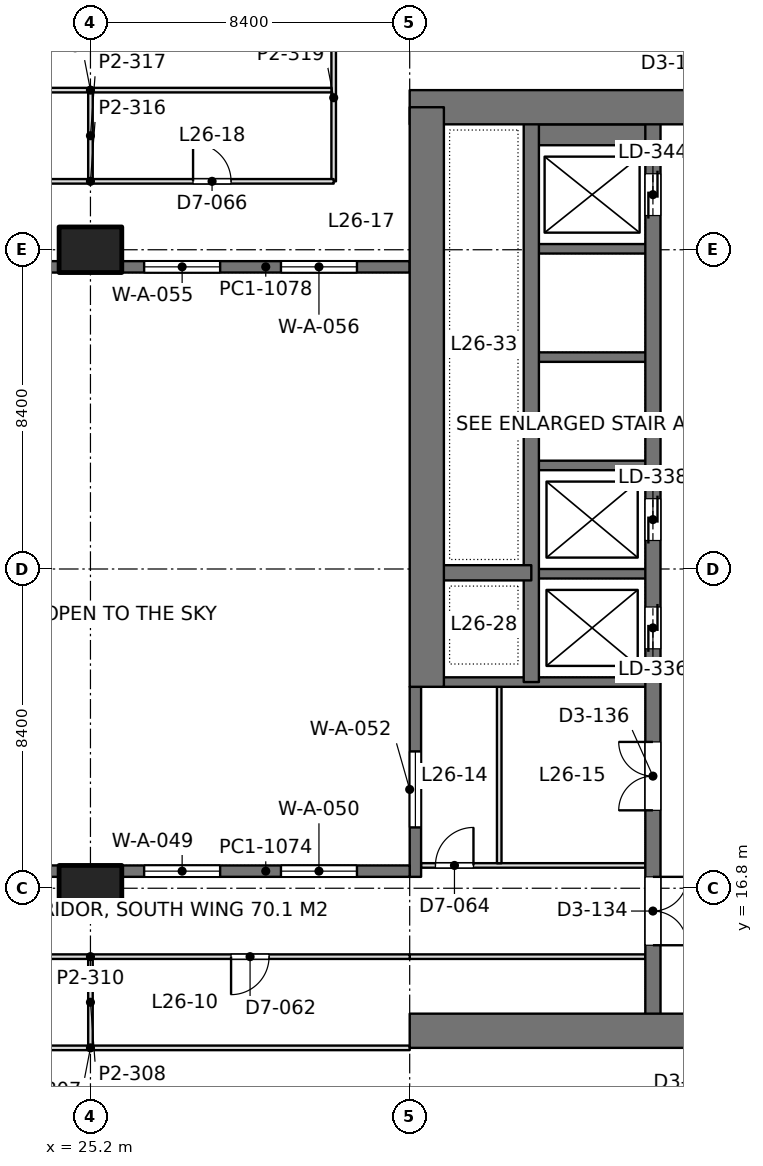
"""IFC4 building model, lengths in metres.
Left out: names, types, materials, properties, quantities, classifications, styles, units other than length and angle.
Written with IfcOpenShell. Run it as: python <this file> out.ifc"""

import sys

from ifc_helpers import new_model, si_unit, direction, frame, frame_2d, origin, origin_2d, place, context, subcontext, project, spatial, rectangle, extrude, element, fill, save


model = new_model("IFC4")
c1 = context("Model", 3, precision=1e-05, world=origin(), true_north=direction((0.0, 1.0)))
c2 = subcontext(c1, "Body", "Model", "MODEL_VIEW")
j1 = project(units=[si_unit("LENGTHUNIT", "METRE"), si_unit("PLANEANGLEUNIT", "RADIAN")], contexts=[c1])
p1 = place(None, origin())
s1 = spatial("IfcSite", under=j1, at=p1, CompositionType="ELEMENT")
p2 = place(p1, origin())
s2 = spatial("IfcBuilding", under=s1, at=p2, CompositionType="ELEMENT")
p3 = place(p2, frame((0.0, 0.0, 117.6)))
s3 = spatial("IfcBuildingStorey", under=s2, at=p3, CompositionType="ELEMENT", Elevation=117.6)
for number, where, z_axis, x_axis in (
    (1, (25.2, 16.8, 0.0), (0.0, 0.0, 1.0), (1.0, 0.0, 0.0)),
    (2, (25.2, 33.6, 0.0), (0.0, 0.0, 1.0), (1.0, 0.0, 0.0)),
):
    element("IfcColumn", number, at=place(p3, frame(where, z_axis=z_axis, x_axis=x_axis)), inside=s3, PredefinedType="COLUMN", context=c2, shape_type="SweptSolid", body=[
        extrude(rectangle(XDim=1.65, YDim=1.2, at=origin_2d()), origin(), (0.0, 0.0, 1.0), 4.2),
    ])
p4 = place(p3, frame((33.6, 13.05, 0.0), z_axis=(0.0, 0.0, 1.0), x_axis=(1.0, 0.0, 0.0)))
e3 = element("IfcWall", 3, at=p4, inside=s3, PredefinedType="SHEAR", context=c2, shape_type="SweptSolid", body=[
    extrude(rectangle(XDim=18.0, YDim=0.9, at=frame_2d((9.0, 0.0))), origin(), (0.0, 0.0, 1.0), 4.2),
])
p5 = place(p4, frame((7.25, 0.0, 0.0)))
e4 = element("IfcOpeningElement", 4, at=p5, cuts=e3, PredefinedType="OPENING", context=c2, shape_type="SweptSolid", body=[
    extrude(rectangle(XDim=1.8, YDim=2.4, at=frame_2d((0.9, 1.2))), frame((0.0, 0.46, 0.0), z_axis=(0.0, -1.0, 0.0), x_axis=(1.0, 0.0, 0.0)), (0.0, 0.0, 1.0), 0.92),
])
p6 = place(p3, frame((33.6, 37.35, 0.0), z_axis=(0.0, 0.0, 1.0), x_axis=(1.0, 0.0, 0.0)))
e5 = element("IfcWall", 5, at=p6, inside=s3, PredefinedType="SHEAR", context=c2, shape_type="SweptSolid", body=[
    extrude(rectangle(XDim=18.0, YDim=0.9, at=frame_2d((9.0, 0.0))), origin(), (0.0, 0.0, 1.0), 4.2),
])
p7 = place(p6, frame((7.25, 0.0, 0.0)))
e6 = element("IfcOpeningElement", 6, at=p7, cuts=e5, PredefinedType="OPENING", context=c2, shape_type="SweptSolid", body=[
    extrude(rectangle(XDim=1.8, YDim=2.4, at=frame_2d((0.9, 1.2))), frame((0.0, 0.46, 0.0), z_axis=(0.0, -1.0, 0.0), x_axis=(1.0, 0.0, 0.0)), (0.0, 0.0, 1.0), 0.92),
])
p8 = place(p3, frame((34.05, 22.1, 0.0), z_axis=(0.0, 0.0, 1.0), x_axis=(0.0, 1.0, 0.0)))
e7 = element("IfcWall", 7, at=p8, inside=s3, PredefinedType="SHEAR", context=c2, shape_type="SweptSolid", body=[
    extrude(rectangle(XDim=15.25, YDim=0.9, at=frame_2d((7.625, 0.0))), origin(), (0.0, 0.0, 1.0), 4.2),
])
p9 = place(p3, frame((40.0, 13.05, 0.0), z_axis=(0.0, 0.0, 1.0), x_axis=(0.0, 1.0, 0.0)))
e8 = element("IfcWall", 8, at=p9, inside=s3, PredefinedType="SHEAR", context=c2, shape_type="SweptSolid", body=[
    extrude(rectangle(XDim=24.3, YDim=0.4, at=frame_2d((12.15, 0.0))), origin(), (0.0, 0.0, 1.0), 4.2),
])
p10 = place(p9, frame((10.05, 0.0, 0.0)))
e9 = element("IfcOpeningElement", 9, at=p10, cuts=e8, PredefinedType="OPENING", context=c2, shape_type="SweptSolid", body=[
    extrude(rectangle(XDim=1.1, YDim=2.2, at=frame_2d((0.55, 1.1))), frame((0.0, 0.21, 0.0), z_axis=(0.0, -1.0, 0.0), x_axis=(1.0, 0.0, 0.0)), (0.0, 0.0, 1.0), 0.42),
])
p11 = place(p9, frame((12.9, 0.0, 0.0)))
e10 = element("IfcOpeningElement", 10, at=p11, cuts=e8, PredefinedType="OPENING", context=c2, shape_type="SweptSolid", body=[
    extrude(rectangle(XDim=1.1, YDim=2.2, at=frame_2d((0.55, 1.1))), frame((0.0, 0.21, 0.0), z_axis=(0.0, -1.0, 0.0), x_axis=(1.0, 0.0, 0.0)), (0.0, 0.0, 1.0), 0.42),
])
p12 = place(p9, frame((21.45, 0.0, 0.0)))
e11 = element("IfcOpeningElement", 11, at=p12, cuts=e8, PredefinedType="OPENING", context=c2, shape_type="SweptSolid", body=[
    extrude(rectangle(XDim=1.1, YDim=2.2, at=frame_2d((0.55, 1.1))), frame((0.0, 0.21, 0.0), z_axis=(0.0, -1.0, 0.0), x_axis=(1.0, 0.0, 0.0)), (0.0, 0.0, 1.0), 0.42),
])
p13 = place(p9, frame((2.25, 0.0, 0.0)))
e12 = element("IfcOpeningElement", 12, at=p13, cuts=e8, PredefinedType="OPENING", context=c2, shape_type="SweptSolid", body=[
    extrude(rectangle(XDim=1.8, YDim=2.4, at=frame_2d((0.9, 1.2))), frame((0.0, 0.21, 0.0), z_axis=(0.0, -1.0, 0.0), x_axis=(1.0, 0.0, 0.0)), (0.0, 0.0, 1.0), 0.42),
])
p14 = place(p9, frame((5.8, 0.0, 0.0)))
e13 = element("IfcOpeningElement", 13, at=p14, cuts=e8, PredefinedType="OPENING", context=c2, shape_type="SweptSolid", body=[
    extrude(rectangle(XDim=1.8, YDim=2.4, at=frame_2d((0.9, 1.2))), frame((0.0, 0.21, 0.0), z_axis=(0.0, -1.0, 0.0), x_axis=(1.0, 0.0, 0.0)), (0.0, 0.0, 1.0), 0.42),
])
p15 = place(p3, frame((36.8, 22.225, 0.0), z_axis=(0.0, 0.0, 1.0), x_axis=(0.0, 1.0, 0.0)))
e14 = element("IfcWall", 14, at=p15, inside=s3, PredefinedType="SHEAR", context=c2, shape_type="SweptSolid", body=[
    extrude(rectangle(XDim=15.125, YDim=0.4, at=frame_2d((7.562, 0.0))), origin(), (0.0, 0.0, 1.0), 4.2),
])
p16 = place(p3, frame((36.8, 25.1, 0.0), z_axis=(0.0, 0.0, 1.0), x_axis=(-1.0, 0.0, 0.0)))
e15 = element("IfcWall", 15, at=p16, inside=s3, PredefinedType="SHEAR", context=c2, shape_type="SweptSolid", body=[
    extrude(rectangle(XDim=2.75, YDim=0.4, at=frame_2d((1.375, 0.0))), origin(), (0.0, 0.0, 1.0), 4.2),
])
p17 = place(p3, frame((40.0, 22.225, 0.0), z_axis=(0.0, 0.0, 1.0), x_axis=(-1.0, 0.0, 0.0)))
e16 = element("IfcWall", 16, at=p17, inside=s3, PredefinedType="SHEAR", context=c2, shape_type="SweptSolid", body=[
    extrude(rectangle(XDim=5.95, YDim=0.25, at=frame_2d((2.975, 0.0))), origin(), (0.0, 0.0, 1.0), 4.2),
])
for number, where, z_axis, x_axis in (
    (17, (40.0, 25.075, 0.0), (0.0, 0.0, 1.0), (-1.0, 0.0, 0.0)),
    (18, (40.0, 27.925, 0.0), (0.0, 0.0, 1.0), (-1.0, 0.0, 0.0)),
    (19, (40.0, 30.775, 0.0), (0.0, 0.0, 1.0), (-1.0, 0.0, 0.0)),
    (20, (40.0, 33.625, 0.0), (0.0, 0.0, 1.0), (-1.0, 0.0, 0.0)),
):
    element("IfcWall", number, at=place(p3, frame(where, z_axis=z_axis, x_axis=x_axis)), inside=s3, PredefinedType="SHEAR", context=c2, shape_type="SweptSolid", body=[
        extrude(rectangle(XDim=3.2, YDim=0.25, at=frame_2d((1.6, 0.0))), origin(), (0.0, 0.0, 1.0), 4.2),
    ])
p18 = place(p3, frame((40.0, 36.625, 0.0), z_axis=(0.0, 0.0, 1.0), x_axis=(-1.0, 0.0, 0.0)))
e21 = element("IfcWall", 21, at=p18, inside=s3, PredefinedType="SHEAR", context=c2, shape_type="SweptSolid", body=[
    extrude(rectangle(XDim=3.2, YDim=0.55, at=frame_2d((1.6, 0.0))), origin(), (0.0, 0.0, 1.0), 4.2),
])
p19 = place(p3, frame((33.75, 17.1, 0.0), z_axis=(0.0, 0.0, 1.0), x_axis=(0.0, 1.0, 0.0)))
e22 = element("IfcWall", 22, at=p19, inside=s3, PredefinedType="SOLIDWALL", context=c2, shape_type="SweptSolid", body=[
    extrude(rectangle(XDim=5.0, YDim=0.3, at=frame_2d((2.5, 0.0))), origin(), (0.0, 0.0, 1.0), 4.05),
])
p20 = place(p19, frame((1.3, 0.0, 0.1)))
e23 = element("IfcOpeningElement", 23, at=p20, cuts=e22, PredefinedType="OPENING", context=c2, shape_type="SweptSolid", body=[
    extrude(rectangle(XDim=2.0, YDim=3.0, at=frame_2d((1.0, 1.5))), frame((0.0, 0.16, 0.0), z_axis=(0.0, -1.0, 0.0), x_axis=(1.0, 0.0, 0.0)), (0.0, 0.0, 1.0), 0.32),
])
p21 = place(p3, frame((16.8, 17.25, 0.0), z_axis=(0.0, 0.0, 1.0), x_axis=(1.0, 0.0, 0.0)))
e24 = element("IfcWall", 24, at=p21, inside=s3, PredefinedType="SOLIDWALL", context=c2, shape_type="SweptSolid", body=[
    extrude(rectangle(XDim=7.575, YDim=0.3, at=frame_2d((3.788, 0.0))), origin(), (0.0, 0.0, 1.0), 4.05),
])
p22 = place(p21, frame((0.988, 0.0, 0.1)))
e25 = element("IfcOpeningElement", 25, at=p22, cuts=e24, PredefinedType="OPENING", context=c2, shape_type="SweptSolid", body=[
    extrude(rectangle(XDim=2.0, YDim=3.0, at=frame_2d((1.0, 1.5))), frame((0.0, 0.16, 0.0), z_axis=(0.0, -1.0, 0.0), x_axis=(1.0, 0.0, 0.0)), (0.0, 0.0, 1.0), 0.32),
])
p23 = place(p21, frame((4.587, 0.0, 0.1)))
e26 = element("IfcOpeningElement", 26, at=p23, cuts=e24, PredefinedType="OPENING", context=c2, shape_type="SweptSolid", body=[
    extrude(rectangle(XDim=2.0, YDim=3.0, at=frame_2d((1.0, 1.5))), frame((0.0, 0.16, 0.0), z_axis=(0.0, -1.0, 0.0), x_axis=(1.0, 0.0, 0.0)), (0.0, 0.0, 1.0), 0.32),
])
p24 = place(p3, frame((26.025, 17.25, 0.0), z_axis=(0.0, 0.0, 1.0), x_axis=(1.0, 0.0, 0.0)))
e27 = element("IfcWall", 27, at=p24, inside=s3, PredefinedType="SOLIDWALL", context=c2, shape_type="SweptSolid", body=[
    extrude(rectangle(XDim=7.575, YDim=0.3, at=frame_2d((3.788, 0.0))), origin(), (0.0, 0.0, 1.0), 4.05),
])
p25 = place(p24, frame((0.587, 0.0, 0.1)))
e28 = element("IfcOpeningElement", 28, at=p25, cuts=e27, PredefinedType="OPENING", context=c2, shape_type="SweptSolid", body=[
    extrude(rectangle(XDim=2.0, YDim=3.0, at=frame_2d((1.0, 1.5))), frame((0.0, 0.16, 0.0), z_axis=(0.0, -1.0, 0.0), x_axis=(1.0, 0.0, 0.0)), (0.0, 0.0, 1.0), 0.32),
])
p26 = place(p24, frame((4.188, 0.0, 0.1)))
e29 = element("IfcOpeningElement", 29, at=p26, cuts=e27, PredefinedType="OPENING", context=c2, shape_type="SweptSolid", body=[
    extrude(rectangle(XDim=2.0, YDim=3.0, at=frame_2d((1.0, 1.5))), frame((0.0, 0.16, 0.0), z_axis=(0.0, -1.0, 0.0), x_axis=(1.0, 0.0, 0.0)), (0.0, 0.0, 1.0), 0.32),
])
p27 = place(p3, frame((16.8, 33.15, 0.0), z_axis=(0.0, 0.0, 1.0), x_axis=(1.0, 0.0, 0.0)))
e30 = element("IfcWall", 30, at=p27, inside=s3, PredefinedType="SOLIDWALL", context=c2, shape_type="SweptSolid", body=[
    extrude(rectangle(XDim=7.575, YDim=0.3, at=frame_2d((3.788, 0.0))), origin(), (0.0, 0.0, 1.0), 4.05),
])
p28 = place(p27, frame((0.988, 0.0, 0.1)))
e31 = element("IfcOpeningElement", 31, at=p28, cuts=e30, PredefinedType="OPENING", context=c2, shape_type="SweptSolid", body=[
    extrude(rectangle(XDim=2.0, YDim=3.0, at=frame_2d((1.0, 1.5))), frame((0.0, 0.16, 0.0), z_axis=(0.0, -1.0, 0.0), x_axis=(1.0, 0.0, 0.0)), (0.0, 0.0, 1.0), 0.32),
])
p29 = place(p27, frame((4.587, 0.0, 0.1)))
e32 = element("IfcOpeningElement", 32, at=p29, cuts=e30, PredefinedType="OPENING", context=c2, shape_type="SweptSolid", body=[
    extrude(rectangle(XDim=2.0, YDim=3.0, at=frame_2d((1.0, 1.5))), frame((0.0, 0.16, 0.0), z_axis=(0.0, -1.0, 0.0), x_axis=(1.0, 0.0, 0.0)), (0.0, 0.0, 1.0), 0.32),
])
p30 = place(p3, frame((26.025, 33.15, 0.0), z_axis=(0.0, 0.0, 1.0), x_axis=(1.0, 0.0, 0.0)))
e33 = element("IfcWall", 33, at=p30, inside=s3, PredefinedType="SOLIDWALL", context=c2, shape_type="SweptSolid", body=[
    extrude(rectangle(XDim=7.575, YDim=0.3, at=frame_2d((3.788, 0.0))), origin(), (0.0, 0.0, 1.0), 4.05),
])
p31 = place(p30, frame((0.587, 0.0, 0.1)))
e34 = element("IfcOpeningElement", 34, at=p31, cuts=e33, PredefinedType="OPENING", context=c2, shape_type="SweptSolid", body=[
    extrude(rectangle(XDim=2.0, YDim=3.0, at=frame_2d((1.0, 1.5))), frame((0.0, 0.16, 0.0), z_axis=(0.0, -1.0, 0.0), x_axis=(1.0, 0.0, 0.0)), (0.0, 0.0, 1.0), 0.32),
])
p32 = place(p30, frame((4.188, 0.0, 0.1)))
e35 = element("IfcOpeningElement", 35, at=p32, cuts=e33, PredefinedType="OPENING", context=c2, shape_type="SweptSolid", body=[
    extrude(rectangle(XDim=2.0, YDim=3.0, at=frame_2d((1.0, 1.5))), frame((0.0, 0.16, 0.0), z_axis=(0.0, -1.0, 0.0), x_axis=(1.0, 0.0, 0.0)), (0.0, 0.0, 1.0), 0.32),
])
p33 = place(p3, frame((33.898, 17.4, 0.0), z_axis=(0.0, 0.0, 1.0), x_axis=(1.0, 0.0, 0.0)))
e36 = element("IfcWall", 36, at=p33, inside=s3, PredefinedType="PARTITIONING", context=c2, shape_type="SweptSolid", body=[
    extrude(rectangle(XDim=5.904, YDim=0.12, at=frame_2d((2.952, 0.0))), origin(), (0.0, 0.0, 1.0), 3.55),
])
p34 = place(p33, frame((0.38, 0.0, 0.0)))
e37 = element("IfcOpeningElement", 37, at=p34, cuts=e36, PredefinedType="OPENING", context=c2, shape_type="SweptSolid", body=[
    extrude(rectangle(XDim=1.0, YDim=2.4, at=frame_2d((0.5, 1.2))), frame((0.0, 0.07, 0.0), z_axis=(0.0, -1.0, 0.0), x_axis=(1.0, 0.0, 0.0)), (0.0, 0.0, 1.0), 0.14),
])
p35 = place(p3, frame((35.956, 17.458, 0.0), z_axis=(0.0, 0.0, 1.0), x_axis=(0.0, 1.0, 0.0)))
e38 = element("IfcWall", 38, at=p35, inside=s3, PredefinedType="PARTITIONING", context=c2, shape_type="SweptSolid", body=[
    extrude(rectangle(XDim=4.644, YDim=0.12, at=frame_2d((2.322, 0.0))), origin(), (0.0, 0.0, 1.0), 3.6),
])
p36 = place(p3, frame((33.598, 15.0, 0.0), z_axis=(0.0, 0.0, 1.0), x_axis=(1.0, 0.0, 0.0)))
e39 = element("IfcWall", 39, at=p36, inside=s3, PredefinedType="PARTITIONING", context=c2, shape_type="SweptSolid", body=[
    extrude(rectangle(XDim=6.204, YDim=0.12, at=frame_2d((3.102, 0.0))), origin(), (0.0, 0.0, 1.0), 3.55),
])
p37 = place(p3, frame((25.2, 12.658, 0.0), z_axis=(0.0, 0.0, 1.0), x_axis=(0.0, 1.0, 0.0)))
e40 = element("IfcWall", 40, at=p37, inside=s3, PredefinedType="PARTITIONING", context=c2, shape_type="SweptSolid", body=[
    extrude(rectangle(XDim=2.284, YDim=0.12, at=frame_2d((1.142, 0.0))), origin(), (0.0, 0.0, 1.0), 3.55),
])
p38 = place(p3, frame((16.798, 15.0, 0.0), z_axis=(0.0, 0.0, 1.0), x_axis=(1.0, 0.0, 0.0)))
e41 = element("IfcWall", 41, at=p38, inside=s3, PredefinedType="PARTITIONING", context=c2, shape_type="SweptSolid", body=[
    extrude(rectangle(XDim=16.804, YDim=0.12, at=frame_2d((8.402, 0.0))), origin(), (0.0, 0.0, 1.0), 3.55),
])
p39 = place(p38, frame((3.702, 0.0, 0.0)))
e42 = element("IfcOpeningElement", 42, at=p39, cuts=e41, PredefinedType="OPENING", context=c2, shape_type="SweptSolid", body=[
    extrude(rectangle(XDim=1.0, YDim=2.4, at=frame_2d((0.5, 1.2))), frame((0.0, 0.07, 0.0), z_axis=(0.0, -1.0, 0.0), x_axis=(1.0, 0.0, 0.0)), (0.0, 0.0, 1.0), 0.14),
])
p40 = place(p38, frame((12.102, 0.0, 0.0)))
e43 = element("IfcOpeningElement", 43, at=p40, cuts=e41, PredefinedType="OPENING", context=c2, shape_type="SweptSolid", body=[
    extrude(rectangle(XDim=1.0, YDim=2.4, at=frame_2d((0.5, 1.2))), frame((0.0, 0.07, 0.0), z_axis=(0.0, -1.0, 0.0), x_axis=(1.0, 0.0, 0.0)), (0.0, 0.0, 1.0), 0.14),
])
p41 = place(p3, frame((16.8, 12.6, 0.0), z_axis=(0.0, 0.0, 1.0), x_axis=(1.0, 0.0, 0.0)))
e44 = element("IfcWall", 44, at=p41, inside=s3, PredefinedType="PARTITIONING", context=c2, shape_type="SweptSolid", body=[
    extrude(rectangle(XDim=16.8, YDim=0.12, at=frame_2d((8.4, 0.0))), origin(), (0.0, 0.0, 1.0), 3.55),
])
p42 = place(p3, frame((31.6, 35.4, 0.0), z_axis=(0.0, 0.0, 1.0), x_axis=(0.0, 1.0, 0.0)))
e45 = element("IfcWall", 45, at=p42, inside=s3, PredefinedType="PARTITIONING", context=c2, shape_type="SweptSolid", body=[
    extrude(rectangle(XDim=4.4, YDim=0.12, at=frame_2d((2.2, 0.0))), origin(), (0.0, 0.0, 1.0), 4.05),
])
p43 = place(p3, frame((25.2, 35.458, 0.0), z_axis=(0.0, 0.0, 1.0), x_axis=(0.0, 1.0, 0.0)))
e46 = element("IfcWall", 46, at=p43, inside=s3, PredefinedType="PARTITIONING", context=c2, shape_type="SweptSolid", body=[
    extrude(rectangle(XDim=2.284, YDim=0.12, at=frame_2d((1.142, 0.0))), origin(), (0.0, 0.0, 1.0), 3.55),
])
p44 = place(p3, frame((18.8, 35.4, 0.0), z_axis=(0.0, 0.0, 1.0), x_axis=(1.0, 0.0, 0.0)))
e47 = element("IfcWall", 47, at=p44, inside=s3, PredefinedType="PARTITIONING", context=c2, shape_type="SweptSolid", body=[
    extrude(rectangle(XDim=12.8, YDim=0.12, at=frame_2d((6.4, 0.0))), origin(), (0.0, 0.0, 1.0), 3.55),
])
p45 = place(p44, frame((2.7, 0.0, 0.0)))
e48 = element("IfcOpeningElement", 48, at=p45, cuts=e47, PredefinedType="OPENING", context=c2, shape_type="SweptSolid", body=[
    extrude(rectangle(XDim=1.0, YDim=2.4, at=frame_2d((0.5, 1.2))), frame((0.0, 0.07, 0.0), z_axis=(0.0, -1.0, 0.0), x_axis=(1.0, 0.0, 0.0)), (0.0, 0.0, 1.0), 0.14),
])
p46 = place(p44, frame((9.1, 0.0, 0.0)))
e49 = element("IfcOpeningElement", 49, at=p46, cuts=e47, PredefinedType="OPENING", context=c2, shape_type="SweptSolid", body=[
    extrude(rectangle(XDim=1.0, YDim=2.4, at=frame_2d((0.5, 1.2))), frame((0.0, 0.07, 0.0), z_axis=(0.0, -1.0, 0.0), x_axis=(1.0, 0.0, 0.0)), (0.0, 0.0, 1.0), 0.14),
])
p47 = place(p3, frame((18.858, 37.8, 0.0), z_axis=(0.0, 0.0, 1.0), x_axis=(1.0, 0.0, 0.0)))
e50 = element("IfcWall", 50, at=p47, inside=s3, PredefinedType="PARTITIONING", context=c2, shape_type="SweptSolid", body=[
    extrude(rectangle(XDim=12.684, YDim=0.12, at=frame_2d((6.342, 0.0))), origin(), (0.0, 0.0, 1.0), 3.55),
])
p48 = place(p20, origin())
e51 = element("IfcWindow", 51, at=p48, inside=s3, PartitioningType="SINGLE_PANEL", PredefinedType="WINDOW", context=c2, shape_type="SweptSolid", body=[
    extrude(rectangle(XDim=2.0, YDim=3.0, at=frame_2d((1.0, 1.5))), frame((0.0, 0.03, 0.0), z_axis=(0.0, -1.0, 0.0), x_axis=(1.0, 0.0, 0.0)), (0.0, 0.0, 1.0), 0.06),
])
fill(e23, e51)
p49 = place(p25, origin())
e52 = element("IfcWindow", 52, at=p49, inside=s3, PartitioningType="SINGLE_PANEL", PredefinedType="WINDOW", context=c2, shape_type="SweptSolid", body=[
    extrude(rectangle(XDim=2.0, YDim=3.0, at=frame_2d((1.0, 1.5))), frame((0.0, 0.03, 0.0), z_axis=(0.0, -1.0, 0.0), x_axis=(1.0, 0.0, 0.0)), (0.0, 0.0, 1.0), 0.06),
])
fill(e28, e52)
p50 = place(p26, origin())
e53 = element("IfcWindow", 53, at=p50, inside=s3, PartitioningType="SINGLE_PANEL", PredefinedType="WINDOW", context=c2, shape_type="SweptSolid", body=[
    extrude(rectangle(XDim=2.0, YDim=3.0, at=frame_2d((1.0, 1.5))), frame((0.0, 0.03, 0.0), z_axis=(0.0, -1.0, 0.0), x_axis=(1.0, 0.0, 0.0)), (0.0, 0.0, 1.0), 0.06),
])
fill(e29, e53)
p51 = place(p31, origin())
e54 = element("IfcWindow", 54, at=p51, inside=s3, PartitioningType="SINGLE_PANEL", PredefinedType="WINDOW", context=c2, shape_type="SweptSolid", body=[
    extrude(rectangle(XDim=2.0, YDim=3.0, at=frame_2d((1.0, 1.5))), frame((0.0, 0.03, 0.0), z_axis=(0.0, -1.0, 0.0), x_axis=(1.0, 0.0, 0.0)), (0.0, 0.0, 1.0), 0.06),
])
fill(e34, e54)
p52 = place(p32, origin())
e55 = element("IfcWindow", 55, at=p52, inside=s3, PartitioningType="SINGLE_PANEL", PredefinedType="WINDOW", context=c2, shape_type="SweptSolid", body=[
    extrude(rectangle(XDim=2.0, YDim=3.0, at=frame_2d((1.0, 1.5))), frame((0.0, 0.03, 0.0), z_axis=(0.0, -1.0, 0.0), x_axis=(1.0, 0.0, 0.0)), (0.0, 0.0, 1.0), 0.06),
])
fill(e35, e55)
p53 = place(p10, origin())
e56 = element("IfcDoor", 56, at=p53, inside=s3, OperationType="DOUBLE_DOOR_SLIDING", PredefinedType="DOOR", context=c2, shape_type="SweptSolid", body=[
    extrude(rectangle(XDim=1.1, YDim=2.2, at=frame_2d((0.55, 1.1))), frame((0.0, 0.025, 0.0), z_axis=(0.0, -1.0, 0.0), x_axis=(1.0, 0.0, 0.0)), (0.0, 0.0, 1.0), 0.05),
])
fill(e9, e56)
p54 = place(p11, origin())
e57 = element("IfcDoor", 57, at=p54, inside=s3, OperationType="DOUBLE_DOOR_SLIDING", PredefinedType="DOOR", context=c2, shape_type="SweptSolid", body=[
    extrude(rectangle(XDim=1.1, YDim=2.2, at=frame_2d((0.55, 1.1))), frame((0.0, 0.025, 0.0), z_axis=(0.0, -1.0, 0.0), x_axis=(1.0, 0.0, 0.0)), (0.0, 0.0, 1.0), 0.05),
])
fill(e10, e57)
p55 = place(p12, origin())
e58 = element("IfcDoor", 58, at=p55, inside=s3, OperationType="DOUBLE_DOOR_SLIDING", PredefinedType="DOOR", context=c2, shape_type="SweptSolid", body=[
    extrude(rectangle(XDim=1.1, YDim=2.2, at=frame_2d((0.55, 1.1))), frame((0.0, 0.025, 0.0), z_axis=(0.0, -1.0, 0.0), x_axis=(1.0, 0.0, 0.0)), (0.0, 0.0, 1.0), 0.05),
])
fill(e11, e58)
p56 = place(p13, frame((1.8, 0.0, 0.0), z_axis=(0.0, 0.0, 1.0), x_axis=(-1.0, 0.0, 0.0)))
e59 = element("IfcDoor", 59, at=p56, inside=s3, OperationType="DOUBLE_DOOR_SINGLE_SWING", PredefinedType="DOOR", context=c2, shape_type="SweptSolid", body=[
    extrude(rectangle(XDim=1.8, YDim=2.4, at=frame_2d((0.9, 1.2))), frame((0.0, 0.025, 0.0), z_axis=(0.0, -1.0, 0.0), x_axis=(1.0, 0.0, 0.0)), (0.0, 0.0, 1.0), 0.05),
])
fill(e12, e59)
p57 = place(p14, origin())
e60 = element("IfcDoor", 60, at=p57, inside=s3, OperationType="DOUBLE_DOOR_SINGLE_SWING", PredefinedType="DOOR", context=c2, shape_type="SweptSolid", body=[
    extrude(rectangle(XDim=1.8, YDim=2.4, at=frame_2d((0.9, 1.2))), frame((0.0, 0.025, 0.0), z_axis=(0.0, -1.0, 0.0), x_axis=(1.0, 0.0, 0.0)), (0.0, 0.0, 1.0), 0.05),
])
fill(e13, e60)
p58 = place(p34, origin())
e61 = element("IfcDoor", 61, at=p58, inside=s3, OperationType="SINGLE_SWING_RIGHT", PredefinedType="DOOR", context=c2, shape_type="SweptSolid", body=[
    extrude(rectangle(XDim=1.0, YDim=2.4, at=frame_2d((0.5, 1.2))), frame((0.0, 0.025, 0.0), z_axis=(0.0, -1.0, 0.0), x_axis=(1.0, 0.0, 0.0)), (0.0, 0.0, 1.0), 0.05),
])
fill(e37, e61)
p59 = place(p40, frame((1.0, 0.0, 0.0), z_axis=(0.0, 0.0, 1.0), x_axis=(-1.0, 0.0, 0.0)))
e62 = element("IfcDoor", 62, at=p59, inside=s3, OperationType="SINGLE_SWING_RIGHT", PredefinedType="DOOR", context=c2, shape_type="SweptSolid", body=[
    extrude(rectangle(XDim=1.0, YDim=2.4, at=frame_2d((0.5, 1.2))), frame((0.0, 0.025, 0.0), z_axis=(0.0, -1.0, 0.0), x_axis=(1.0, 0.0, 0.0)), (0.0, 0.0, 1.0), 0.05),
])
fill(e43, e62)
p60 = place(p46, origin())
e63 = element("IfcDoor", 63, at=p60, inside=s3, OperationType="SINGLE_SWING_LEFT", PredefinedType="DOOR", context=c2, shape_type="SweptSolid", body=[
    extrude(rectangle(XDim=1.0, YDim=2.4, at=frame_2d((0.5, 1.2))), frame((0.0, 0.025, 0.0), z_axis=(0.0, -1.0, 0.0), x_axis=(1.0, 0.0, 0.0)), (0.0, 0.0, 1.0), 0.05),
])
fill(e49, e63)
save(model, sys.argv[1])
